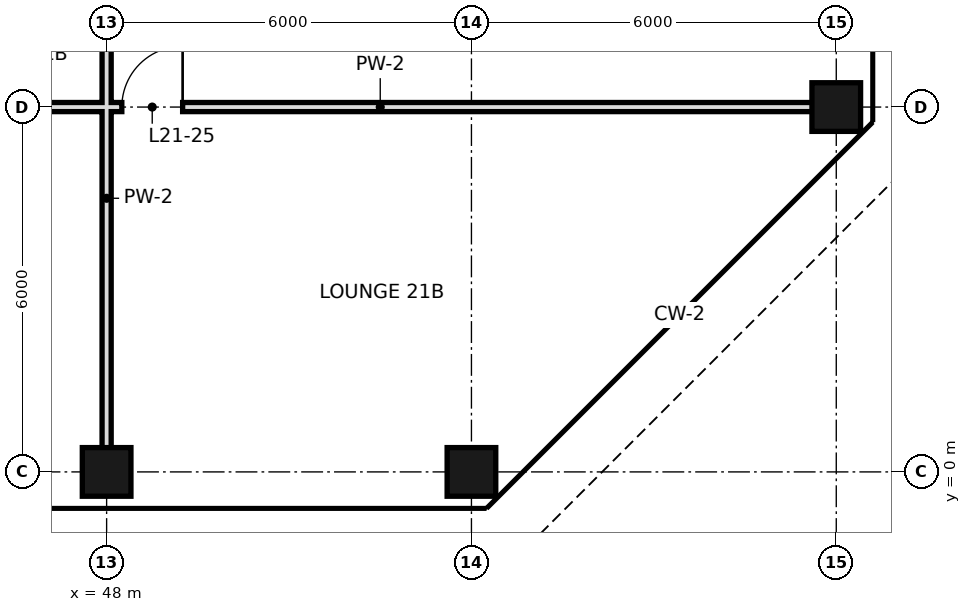
"""IFC4 building model, lengths in metres.
Left out: names, types, materials, properties, quantities, classifications, styles, units other than length and angle.
Written with IfcOpenShell. Run it as: python <this file> out.ifc"""

import sys

from ifc_helpers import new_model, si_unit, direction, frame, frame_2d, origin, origin_2d, place, context, subcontext, project, spatial, rectangle, hollow_rectangle, extrude, element, fill, save


model = new_model("IFC4")
c1 = context("Model", 3, precision=1e-05, world=origin(), true_north=direction((0.0, 1.0)))
c2 = subcontext(c1, "Body", "Model", "MODEL_VIEW")
j1 = project(units=[si_unit("LENGTHUNIT", "METRE"), si_unit("PLANEANGLEUNIT", "RADIAN")], contexts=[c1])
p1 = place(None, origin())
s1 = spatial("IfcSite", under=j1, at=p1, CompositionType="ELEMENT")
p2 = place(p1, origin())
s2 = spatial("IfcBuilding", under=s1, at=p2, CompositionType="ELEMENT")
p3 = place(p2, frame((0.0, 0.0, 99.8)))
s3 = spatial("IfcBuildingStorey", under=s2, at=p3, CompositionType="ELEMENT", Elevation=99.8)
for number, where, z_axis, x_axis in (
    (1, (48.0, 0.0, 0.0), (0.0, 0.0, 1.0), (1.0, 0.0, 0.0)),
    (2, (54.0, 0.0, 0.0), (0.0, 0.0, 1.0), (1.0, 0.0, 0.0)),
    (3, (60.0, 6.0, 0.0), (0.0, 0.0, 1.0), (1.0, 0.0, 0.0)),
):
    element("IfcColumn", number, at=place(p3, frame(where, z_axis=z_axis, x_axis=x_axis)), inside=s3, PredefinedType="COLUMN", context=c2, shape_type="SweptSolid", body=[
        extrude(hollow_rectangle(XDim=0.8, YDim=0.8, WallThickness=0.04, at=origin_2d()), origin(), (0.0, 0.0, 1.0), 3.6),
    ])
p4 = place(p3, frame((48.0, 0.0, 0.0), z_axis=(0.0, 0.0, 1.0), x_axis=(0.0, 1.0, 0.0)))
e4 = element("IfcWall", 4, at=p4, inside=s3, PredefinedType="PARTITIONING", context=c2, shape_type="SweptSolid", body=[
    extrude(rectangle(XDim=9.0, YDim=0.15, at=frame_2d((4.5, 0.0))), origin(), (0.0, 0.0, 1.0), 2.72),
])
p5 = place(p3, frame((45.0, 6.0, 0.0), z_axis=(0.0, 0.0, 1.0), x_axis=(1.0, 0.0, 0.0)))
e5 = element("IfcWall", 5, at=p5, inside=s3, PredefinedType="PARTITIONING", context=c2, shape_type="SweptSolid", body=[
    extrude(rectangle(XDim=15.0, YDim=0.15, at=frame_2d((7.5, 0.0))), origin(), (0.0, 0.0, 1.0), 2.72),
])
p6 = place(p5, frame((0.7, 0.0, 0.0)))
e6 = element("IfcOpeningElement", 6, at=p6, cuts=e5, PredefinedType="OPENING", context=c2, shape_type="SweptSolid", body=[
    extrude(rectangle(XDim=1.0, YDim=2.4, at=frame_2d((0.5, 1.2))), frame((0.0, 0.085, 0.0), z_axis=(0.0, -1.0, 0.0), x_axis=(1.0, 0.0, 0.0)), (0.0, 0.0, 1.0), 0.17),
])
p7 = place(p5, frame((3.25, 0.0, 0.0)))
e7 = element("IfcOpeningElement", 7, at=p7, cuts=e5, PredefinedType="OPENING", context=c2, shape_type="SweptSolid", body=[
    extrude(rectangle(XDim=1.0, YDim=2.4, at=frame_2d((0.5, 1.2))), frame((0.0, 0.085, 0.0), z_axis=(0.0, -1.0, 0.0), x_axis=(1.0, 0.0, 0.0)), (0.0, 0.0, 1.0), 0.17),
])
p8 = place(p7, frame((1.0, 0.0, 0.0), z_axis=(0.0, 0.0, 1.0), x_axis=(-1.0, 0.0, 0.0)))
e8 = element("IfcDoor", 8, at=p8, inside=s3, OperationType="SINGLE_SWING_LEFT", PredefinedType="DOOR", context=c2, shape_type="SweptSolid", body=[
    extrude(rectangle(XDim=1.0, YDim=2.4, at=frame_2d((0.5, 1.2))), frame((0.0, 0.025, 0.0), z_axis=(0.0, -1.0, 0.0), x_axis=(1.0, 0.0, 0.0)), (0.0, 0.0, 1.0), 0.05),
])
fill(e7, e8)
save(model, sys.argv[1])
